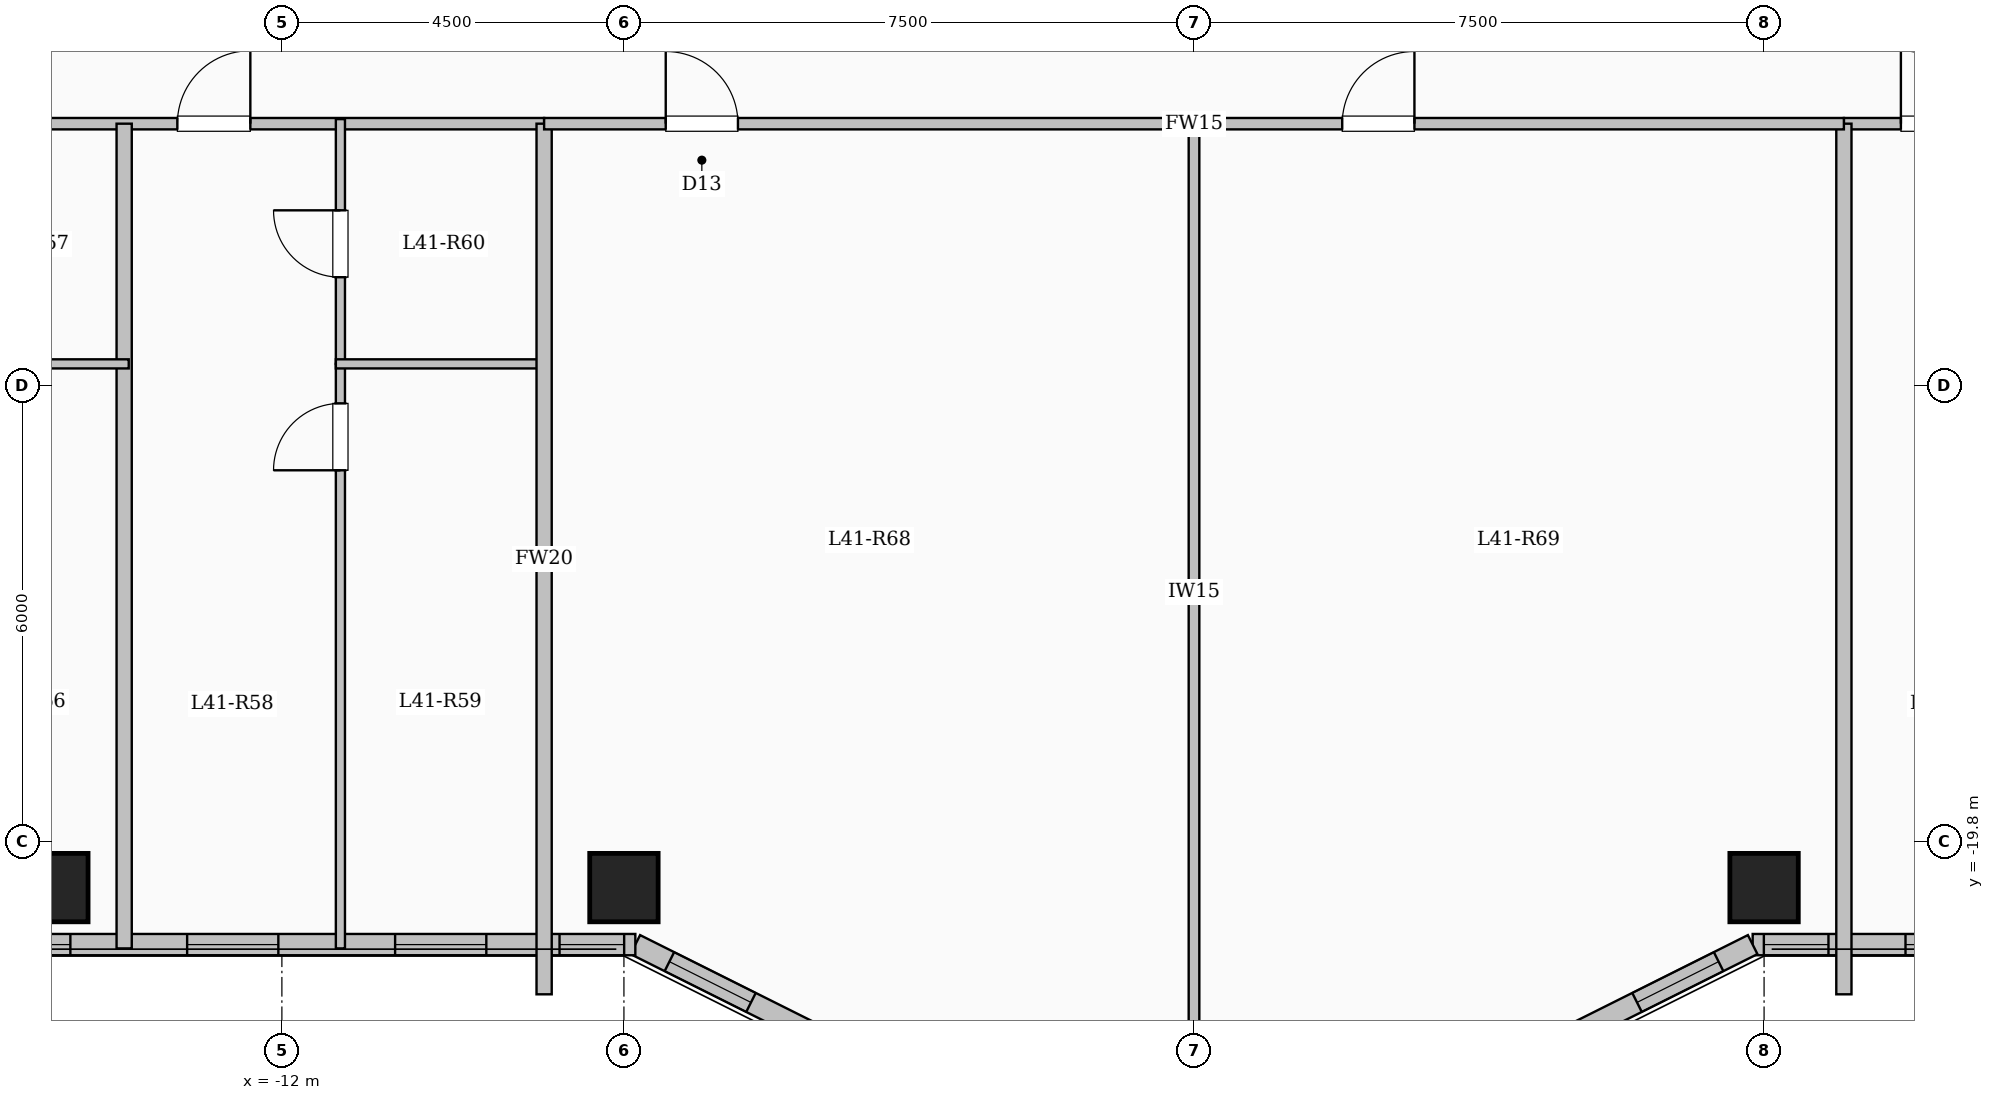
"""IFC4 building model, lengths in metres.
Left out: names, types, materials, properties, quantities, classifications, styles, units other than length and angle.
Written with IfcOpenShell. Run it as: python <this file> out.ifc"""

import sys

from ifc_helpers import new_model, si_unit, direction, frame, frame_2d, origin, origin_2d, place, context, subcontext, project, spatial, rectangle, extrude, element, fill, save


model = new_model("IFC4")
c1 = context("Model", 3, precision=1e-05, world=origin(), true_north=direction((0.0, 1.0)))
c2 = subcontext(c1, "Body", "Model", "MODEL_VIEW")
j1 = project(units=[si_unit("LENGTHUNIT", "METRE"), si_unit("PLANEANGLEUNIT", "RADIAN")], contexts=[c1])
p1 = place(None, origin())
s1 = spatial("IfcSite", under=j1, at=p1, CompositionType="ELEMENT")
p2 = place(p1, origin())
s2 = spatial("IfcBuilding", under=s1, at=p2, CompositionType="ELEMENT")
p3 = place(p2, frame((0.0, 0.0, 152.7)))
s3 = spatial("IfcBuildingStorey", under=s2, at=p3, CompositionType="ELEMENT", Elevation=152.7)
for number, where, z_axis, x_axis in (
    (1, (-15.0, -20.4, 0.0), (0.0, 0.0, 1.0), (1.0, 0.0, 0.0)),
    (2, (-7.5, -20.4, 0.0), (0.0, 0.0, 1.0), (1.0, 0.0, 0.0)),
    (3, (7.5, -20.4, 0.0), (0.0, 0.0, 1.0), (1.0, 0.0, 0.0)),
):
    element("IfcColumn", number, at=place(p3, frame(where, z_axis=z_axis, x_axis=x_axis)), inside=s3, PredefinedType="COLUMN", context=c2, shape_type="SweptSolid", body=[
        extrude(rectangle(XDim=0.9, YDim=0.9, at=origin_2d()), origin(), (0.0, 0.0, 1.0), 3.35),
    ])
p4 = place(p3, frame((19.65, -21.15, 0.0), z_axis=(0.0, 0.0, 1.0), x_axis=(-1.0, 0.0, 0.0)))
e4 = element("IfcWall", 4, at=p4, inside=s3, PredefinedType="SOLIDWALL", context=c2, shape_type="SweptSolid", body=[
    extrude(rectangle(XDim=12.3, YDim=0.28, at=frame_2d((6.15, 0.0))), origin(), (0.0, 0.0, 1.0), 3.1),
])
p5 = place(p4, frame((0.856, 0.0, 0.95)))
e5 = element("IfcOpeningElement", 5, at=p5, cuts=e4, PredefinedType="OPENING", context=c2, shape_type="SweptSolid", body=[
    extrude(rectangle(XDim=1.2, YDim=1.5, at=frame_2d((0.6, 0.75))), frame((0.0, 0.15, 0.0), z_axis=(0.0, -1.0, 0.0), x_axis=(1.0, 0.0, 0.0)), (0.0, 0.0, 1.0), 0.3),
])
p6 = place(p4, frame((3.568, 0.0, 0.9)))
e6 = element("IfcOpeningElement", 6, at=p6, cuts=e4, PredefinedType="OPENING", context=c2, shape_type="SweptSolid", body=[
    extrude(rectangle(XDim=1.5, YDim=1.65, at=frame_2d((0.75, 0.825))), frame((0.0, 0.15, 0.0), z_axis=(0.0, -1.0, 0.0), x_axis=(1.0, 0.0, 0.0)), (0.0, 0.0, 1.0), 0.3),
])
p7 = place(p4, frame((6.454, 0.0, 0.95)))
e7 = element("IfcOpeningElement", 7, at=p7, cuts=e4, PredefinedType="OPENING", context=c2, shape_type="SweptSolid", body=[
    extrude(rectangle(XDim=1.2, YDim=1.5, at=frame_2d((0.6, 0.75))), frame((0.0, 0.15, 0.0), z_axis=(0.0, -1.0, 0.0), x_axis=(1.0, 0.0, 0.0)), (0.0, 0.0, 1.0), 0.3),
])
p8 = place(p4, frame((9.089, 0.0, 0.95)))
e8 = element("IfcOpeningElement", 8, at=p8, cuts=e4, PredefinedType="OPENING", context=c2, shape_type="SweptSolid", body=[
    extrude(rectangle(XDim=1.2, YDim=1.5, at=frame_2d((0.6, 0.75))), frame((0.0, 0.15, 0.0), z_axis=(0.0, -1.0, 0.0), x_axis=(1.0, 0.0, 0.0)), (0.0, 0.0, 1.0), 0.3),
])
p9 = place(p4, frame((11.303, 0.0, 0.95)))
e9 = element("IfcOpeningElement", 9, at=p9, cuts=e4, PredefinedType="OPENING", context=c2, shape_type="SweptSolid", body=[
    extrude(rectangle(XDim=0.85, YDim=1.5, at=frame_2d((0.425, 0.75))), frame((0.0, 0.15, 0.0), z_axis=(0.0, -1.0, 0.0), x_axis=(1.0, 0.0, 0.0)), (0.0, 0.0, 1.0), 0.3),
])
p10 = place(p3, frame((7.35, -21.15, 0.0), z_axis=(0.0, 0.0, 1.0), x_axis=(-0.894427191, -0.4472135955, 0.0)))
e10 = element("IfcWall", 10, at=p10, inside=s3, PredefinedType="SOLIDWALL", context=c2, shape_type="SweptSolid", body=[
    extrude(rectangle(XDim=3.354, YDim=0.28, at=frame_2d((1.677, 0.0))), origin(), (0.0, 0.0, 1.0), 3.1),
])
p11 = place(p10, frame((0.501, 0.0, 0.95)))
e11 = element("IfcOpeningElement", 11, at=p11, cuts=e10, PredefinedType="OPENING", context=c2, shape_type="SweptSolid", body=[
    extrude(rectangle(XDim=1.2, YDim=1.5, at=frame_2d((0.6, 0.75))), frame((0.0, 0.15, 0.0), z_axis=(0.0, -1.0, 0.0), x_axis=(1.0, 0.0, 0.0)), (0.0, 0.0, 1.0), 0.3),
])
p12 = place(p3, frame((-4.35, -22.65, 0.0), z_axis=(0.0, 0.0, 1.0), x_axis=(-0.894427191, 0.4472135955, 0.0)))
e12 = element("IfcWall", 12, at=p12, inside=s3, PredefinedType="SOLIDWALL", context=c2, shape_type="SweptSolid", body=[
    extrude(rectangle(XDim=3.354, YDim=0.28, at=frame_2d((1.677, 0.0))), origin(), (0.0, 0.0, 1.0), 3.1),
])
p13 = place(p12, frame((1.653, 0.0, 0.95)))
e13 = element("IfcOpeningElement", 13, at=p13, cuts=e12, PredefinedType="OPENING", context=c2, shape_type="SweptSolid", body=[
    extrude(rectangle(XDim=1.2, YDim=1.5, at=frame_2d((0.6, 0.75))), frame((0.0, 0.15, 0.0), z_axis=(0.0, -1.0, 0.0), x_axis=(1.0, 0.0, 0.0)), (0.0, 0.0, 1.0), 0.3),
])
p14 = place(p3, frame((-7.35, -21.15, 0.0), z_axis=(0.0, 0.0, 1.0), x_axis=(-1.0, 0.0, 0.0)))
e14 = element("IfcWall", 14, at=p14, inside=s3, PredefinedType="SOLIDWALL", context=c2, shape_type="SweptSolid", body=[
    extrude(rectangle(XDim=12.3, YDim=0.28, at=frame_2d((6.15, 0.0))), origin(), (0.0, 0.0, 1.0), 3.1),
])
p15 = place(p14, frame((0.147, 0.0, 0.95)))
e15 = element("IfcOpeningElement", 15, at=p15, cuts=e14, PredefinedType="OPENING", context=c2, shape_type="SweptSolid", body=[
    extrude(rectangle(XDim=0.85, YDim=1.5, at=frame_2d((0.425, 0.75))), frame((0.0, 0.15, 0.0), z_axis=(0.0, -1.0, 0.0), x_axis=(1.0, 0.0, 0.0)), (0.0, 0.0, 1.0), 0.3),
])
p16 = place(p14, frame((1.96, 0.0, 0.95)))
e16 = element("IfcOpeningElement", 16, at=p16, cuts=e14, PredefinedType="OPENING", context=c2, shape_type="SweptSolid", body=[
    extrude(rectangle(XDim=1.2, YDim=1.5, at=frame_2d((0.6, 0.75))), frame((0.0, 0.15, 0.0), z_axis=(0.0, -1.0, 0.0), x_axis=(1.0, 0.0, 0.0)), (0.0, 0.0, 1.0), 0.3),
])
p17 = place(p14, frame((4.697, 0.0, 0.95)))
e17 = element("IfcOpeningElement", 17, at=p17, cuts=e14, PredefinedType="OPENING", context=c2, shape_type="SweptSolid", body=[
    extrude(rectangle(XDim=1.2, YDim=1.5, at=frame_2d((0.6, 0.75))), frame((0.0, 0.15, 0.0), z_axis=(0.0, -1.0, 0.0), x_axis=(1.0, 0.0, 0.0)), (0.0, 0.0, 1.0), 0.3),
])
p18 = place(p14, frame((7.433, 0.0, 0.95)))
e18 = element("IfcOpeningElement", 18, at=p18, cuts=e14, PredefinedType="OPENING", context=c2, shape_type="SweptSolid", body=[
    extrude(rectangle(XDim=1.2, YDim=1.5, at=frame_2d((0.6, 0.75))), frame((0.0, 0.15, 0.0), z_axis=(0.0, -1.0, 0.0), x_axis=(1.0, 0.0, 0.0)), (0.0, 0.0, 1.0), 0.3),
])
p19 = place(p14, frame((10.194, 0.0, 0.95)))
e19 = element("IfcOpeningElement", 19, at=p19, cuts=e14, PredefinedType="OPENING", context=c2, shape_type="SweptSolid", body=[
    extrude(rectangle(XDim=1.2, YDim=1.5, at=frame_2d((0.6, 0.75))), frame((0.0, 0.15, 0.0), z_axis=(0.0, -1.0, 0.0), x_axis=(1.0, 0.0, 0.0)), (0.0, 0.0, 1.0), 0.3),
])
p20 = place(p3, frame((-19.55, -10.35, 0.0), z_axis=(0.0, 0.0, 1.0), x_axis=(1.0, 0.0, 0.0)))
e20 = element("IfcWall", 20, at=p20, inside=s3, PredefinedType="PARTITIONING", context=c2, shape_type="SweptSolid", body=[
    extrude(rectangle(XDim=11.0, YDim=0.15, at=frame_2d((5.5, 0.0))), origin(), (0.0, 0.0, 1.0), 3.1),
])
p21 = place(p20, frame((0.7, 0.0, 0.0)))
e21 = element("IfcOpeningElement", 21, at=p21, cuts=e20, PredefinedType="OPENING", context=c2, shape_type="SweptSolid", body=[
    extrude(rectangle(XDim=0.96, YDim=2.15, at=frame_2d((0.48, 1.075))), frame((0.0, 0.085, 0.0), z_axis=(0.0, -1.0, 0.0), x_axis=(1.0, 0.0, 0.0)), (0.0, 0.0, 1.0), 0.17),
])
p22 = place(p20, frame((6.175, 0.0, 0.0)))
e22 = element("IfcOpeningElement", 22, at=p22, cuts=e20, PredefinedType="OPENING", context=c2, shape_type="SweptSolid", body=[
    extrude(rectangle(XDim=0.96, YDim=2.15, at=frame_2d((0.48, 1.075))), frame((0.0, 0.085, 0.0), z_axis=(0.0, -1.0, 0.0), x_axis=(1.0, 0.0, 0.0)), (0.0, 0.0, 1.0), 0.17),
])
p23 = place(p3, frame((8.55, -10.35, 0.0), z_axis=(0.0, 0.0, 1.0), x_axis=(1.0, 0.0, 0.0)))
e23 = element("IfcWall", 23, at=p23, inside=s3, PredefinedType="PARTITIONING", context=c2, shape_type="SweptSolid", body=[
    extrude(rectangle(XDim=11.0, YDim=0.15, at=frame_2d((5.5, 0.0))), origin(), (0.0, 0.0, 1.0), 3.1),
])
p24 = place(p23, frame((0.75, 0.0, 0.0)))
e24 = element("IfcOpeningElement", 24, at=p24, cuts=e23, PredefinedType="OPENING", context=c2, shape_type="SweptSolid", body=[
    extrude(rectangle(XDim=0.96, YDim=2.15, at=frame_2d((0.48, 1.075))), frame((0.0, 0.085, 0.0), z_axis=(0.0, -1.0, 0.0), x_axis=(1.0, 0.0, 0.0)), (0.0, 0.0, 1.0), 0.17),
])
p25 = place(p23, frame((6.006, 0.0, 0.0)))
e25 = element("IfcOpeningElement", 25, at=p25, cuts=e23, PredefinedType="OPENING", context=c2, shape_type="SweptSolid", body=[
    extrude(rectangle(XDim=0.96, YDim=2.15, at=frame_2d((0.48, 1.075))), frame((0.0, 0.085, 0.0), z_axis=(0.0, -1.0, 0.0), x_axis=(1.0, 0.0, 0.0)), (0.0, 0.0, 1.0), 0.17),
])
p26 = place(p3, frame((-14.075, -21.2, 0.0), z_axis=(0.0, 0.0, 1.0), x_axis=(0.0, 1.0, 0.0)))
e26 = element("IfcWall", 26, at=p26, inside=s3, PredefinedType="SOLIDWALL", context=c2, shape_type="SweptSolid", body=[
    extrude(rectangle(XDim=10.85, YDim=0.2, at=frame_2d((5.425, 0.0))), origin(), (0.0, 0.0, 1.0), 3.1),
])
p27 = place(p3, frame((-16.765, -13.51, 0.0), z_axis=(0.0, 0.0, 1.0), x_axis=(1.0, 0.0, 0.0)))
e27 = element("IfcWall", 27, at=p27, inside=s3, PredefinedType="PARTITIONING", context=c2, shape_type="SweptSolid", body=[
    extrude(rectangle(XDim=2.75, YDim=0.12, at=frame_2d((1.375, 0.0))), origin(), (0.0, 0.0, 1.0), 3.1),
])
p28 = place(p3, frame((-11.23, -21.2, 0.0), z_axis=(0.0, 0.0, 1.0), x_axis=(0.0, 1.0, 0.0)))
e28 = element("IfcWall", 28, at=p28, inside=s3, PredefinedType="PARTITIONING", context=c2, shape_type="SweptSolid", body=[
    extrude(rectangle(XDim=7.69, YDim=0.12, at=frame_2d((3.845, 0.0))), origin(), (0.0, 0.0, 1.0), 3.1),
])
p29 = place(p28, frame((6.29, 0.0, 0.0)))
e29 = element("IfcOpeningElement", 29, at=p29, cuts=e28, PredefinedType="OPENING", context=c2, shape_type="SweptSolid", body=[
    extrude(rectangle(XDim=0.88, YDim=2.1, at=frame_2d((0.44, 1.05))), frame((0.0, 0.07, 0.0), z_axis=(0.0, -1.0, 0.0), x_axis=(1.0, 0.0, 0.0)), (0.0, 0.0, 1.0), 0.14),
])
p30 = place(p3, frame((-11.23, -13.51, 0.0), z_axis=(0.0, 0.0, 1.0), x_axis=(0.0, 1.0, 0.0)))
e30 = element("IfcWall", 30, at=p30, inside=s3, PredefinedType="PARTITIONING", context=c2, shape_type="SweptSolid", body=[
    extrude(rectangle(XDim=3.22, YDim=0.12, at=frame_2d((1.61, 0.0))), origin(), (0.0, 0.0, 1.0), 3.1),
])
p31 = place(p30, frame((1.14, 0.0, 0.0)))
e31 = element("IfcOpeningElement", 31, at=p31, cuts=e30, PredefinedType="OPENING", context=c2, shape_type="SweptSolid", body=[
    extrude(rectangle(XDim=0.88, YDim=2.1, at=frame_2d((0.44, 1.05))), frame((0.0, 0.07, 0.0), z_axis=(0.0, -1.0, 0.0), x_axis=(1.0, 0.0, 0.0)), (0.0, 0.0, 1.0), 0.14),
])
p32 = place(p3, frame((-11.29, -13.51, 0.0), z_axis=(0.0, 0.0, 1.0), x_axis=(1.0, 0.0, 0.0)))
e32 = element("IfcWall", 32, at=p32, inside=s3, PredefinedType="PARTITIONING", context=c2, shape_type="SweptSolid", body=[
    extrude(rectangle(XDim=2.75, YDim=0.12, at=frame_2d((1.375, 0.0))), origin(), (0.0, 0.0, 1.0), 3.1),
])
for number, where, z_axis, x_axis in (
    (33, (-8.55, -21.804, 0.0), (0.0, 0.0, 1.0), (0.0, 1.0, 0.0)),
    (34, (8.55, -21.804, 0.0), (0.0, 0.0, 1.0), (0.0, 1.0, 0.0)),
):
    element("IfcWall", number, at=place(p3, frame(where, z_axis=z_axis, x_axis=x_axis)), inside=s3, PredefinedType="SOLIDWALL", context=c2, shape_type="SweptSolid", body=[
        extrude(rectangle(XDim=11.454, YDim=0.2, at=frame_2d((5.727, 0.0))), origin(), (0.0, 0.0, 1.0), 3.1),
    ])
p33 = place(p3, frame((-8.55, -10.35, 0.0), z_axis=(0.0, 0.0, 1.0), x_axis=(1.0, 0.0, 0.0)))
e35 = element("IfcWall", 35, at=p33, inside=s3, PredefinedType="PARTITIONING", context=c2, shape_type="SweptSolid", body=[
    extrude(rectangle(XDim=17.1, YDim=0.15, at=frame_2d((8.55, 0.0))), origin(), (0.0, 0.0, 1.0), 3.1),
])
p34 = place(p33, frame((1.6, 0.0, 0.0)))
e36 = element("IfcOpeningElement", 36, at=p34, cuts=e35, PredefinedType="OPENING", context=c2, shape_type="SweptSolid", body=[
    extrude(rectangle(XDim=0.95, YDim=2.15, at=frame_2d((0.475, 1.075))), frame((0.0, 0.085, 0.0), z_axis=(0.0, -1.0, 0.0), x_axis=(1.0, 0.0, 0.0)), (0.0, 0.0, 1.0), 0.17),
])
p35 = place(p33, frame((10.5, 0.0, 0.0)))
e37 = element("IfcOpeningElement", 37, at=p35, cuts=e35, PredefinedType="OPENING", context=c2, shape_type="SweptSolid", body=[
    extrude(rectangle(XDim=0.95, YDim=2.15, at=frame_2d((0.475, 1.075))), frame((0.0, 0.085, 0.0), z_axis=(0.0, -1.0, 0.0), x_axis=(1.0, 0.0, 0.0)), (0.0, 0.0, 1.0), 0.17),
])
p36 = place(p3, frame((0.0, -22.68, 0.0), z_axis=(0.0, 0.0, 1.0), x_axis=(0.0, 1.0, 0.0)))
e38 = element("IfcWall", 38, at=p36, inside=s3, PredefinedType="PARTITIONING", context=c2, shape_type="SweptSolid", body=[
    extrude(rectangle(XDim=12.33, YDim=0.14, at=frame_2d((6.165, 0.0))), origin(), (0.0, 0.0, 1.0), 3.1),
])
p37 = place(p8, origin())
e39 = element("IfcWindow", 39, at=p37, inside=s3, PartitioningType="SINGLE_PANEL", PredefinedType="WINDOW", context=c2, shape_type="SweptSolid", body=[
    extrude(rectangle(XDim=1.2, YDim=1.5, at=frame_2d((0.6, 0.75))), frame((0.0, 0.03, 0.0), z_axis=(0.0, -1.0, 0.0), x_axis=(1.0, 0.0, 0.0)), (0.0, 0.0, 1.0), 0.06),
])
fill(e8, e39)
p38 = place(p9, origin())
e40 = element("IfcWindow", 40, at=p38, inside=s3, PartitioningType="SINGLE_PANEL", PredefinedType="WINDOW", context=c2, shape_type="SweptSolid", body=[
    extrude(rectangle(XDim=0.85, YDim=1.5, at=frame_2d((0.425, 0.75))), frame((0.0, 0.03, 0.0), z_axis=(0.0, -1.0, 0.0), x_axis=(1.0, 0.0, 0.0)), (0.0, 0.0, 1.0), 0.06),
])
fill(e9, e40)
p39 = place(p11, origin())
e41 = element("IfcWindow", 41, at=p39, inside=s3, PartitioningType="SINGLE_PANEL", PredefinedType="WINDOW", context=c2, shape_type="SweptSolid", body=[
    extrude(rectangle(XDim=1.2, YDim=1.5, at=frame_2d((0.6, 0.75))), frame((0.0, 0.03, 0.0), z_axis=(0.0, -1.0, 0.0), x_axis=(1.0, 0.0, 0.0)), (0.0, 0.0, 1.0), 0.06),
])
fill(e11, e41)
p40 = place(p13, origin())
e42 = element("IfcWindow", 42, at=p40, inside=s3, PartitioningType="SINGLE_PANEL", PredefinedType="WINDOW", context=c2, shape_type="SweptSolid", body=[
    extrude(rectangle(XDim=1.2, YDim=1.5, at=frame_2d((0.6, 0.75))), frame((0.0, 0.03, 0.0), z_axis=(0.0, -1.0, 0.0), x_axis=(1.0, 0.0, 0.0)), (0.0, 0.0, 1.0), 0.06),
])
fill(e13, e42)
p41 = place(p15, origin())
e43 = element("IfcWindow", 43, at=p41, inside=s3, PartitioningType="SINGLE_PANEL", PredefinedType="WINDOW", context=c2, shape_type="SweptSolid", body=[
    extrude(rectangle(XDim=0.85, YDim=1.5, at=frame_2d((0.425, 0.75))), frame((0.0, 0.03, 0.0), z_axis=(0.0, -1.0, 0.0), x_axis=(1.0, 0.0, 0.0)), (0.0, 0.0, 1.0), 0.06),
])
fill(e15, e43)
p42 = place(p16, origin())
e44 = element("IfcWindow", 44, at=p42, inside=s3, PartitioningType="SINGLE_PANEL", PredefinedType="WINDOW", context=c2, shape_type="SweptSolid", body=[
    extrude(rectangle(XDim=1.2, YDim=1.5, at=frame_2d((0.6, 0.75))), frame((0.0, 0.03, 0.0), z_axis=(0.0, -1.0, 0.0), x_axis=(1.0, 0.0, 0.0)), (0.0, 0.0, 1.0), 0.06),
])
fill(e16, e44)
p43 = place(p17, origin())
e45 = element("IfcWindow", 45, at=p43, inside=s3, PartitioningType="SINGLE_PANEL", PredefinedType="WINDOW", context=c2, shape_type="SweptSolid", body=[
    extrude(rectangle(XDim=1.2, YDim=1.5, at=frame_2d((0.6, 0.75))), frame((0.0, 0.03, 0.0), z_axis=(0.0, -1.0, 0.0), x_axis=(1.0, 0.0, 0.0)), (0.0, 0.0, 1.0), 0.06),
])
fill(e17, e45)
p44 = place(p18, origin())
e46 = element("IfcWindow", 46, at=p44, inside=s3, PartitioningType="SINGLE_PANEL", PredefinedType="WINDOW", context=c2, shape_type="SweptSolid", body=[
    extrude(rectangle(XDim=1.2, YDim=1.5, at=frame_2d((0.6, 0.75))), frame((0.0, 0.03, 0.0), z_axis=(0.0, -1.0, 0.0), x_axis=(1.0, 0.0, 0.0)), (0.0, 0.0, 1.0), 0.06),
])
fill(e18, e46)
p45 = place(p22, origin())
e47 = element("IfcDoor", 47, at=p45, inside=s3, OperationType="SINGLE_SWING_RIGHT", PredefinedType="DOOR", context=c2, shape_type="SweptSolid", body=[
    extrude(rectangle(XDim=0.96, YDim=2.15, at=frame_2d((0.48, 1.075))), frame((0.0, 0.025, 0.0), z_axis=(0.0, -1.0, 0.0), x_axis=(1.0, 0.0, 0.0)), (0.0, 0.0, 1.0), 0.05),
])
fill(e22, e47)
p46 = place(p29, origin())
e48 = element("IfcDoor", 48, at=p46, inside=s3, OperationType="SINGLE_SWING_LEFT", PredefinedType="DOOR", context=c2, shape_type="SweptSolid", body=[
    extrude(rectangle(XDim=0.88, YDim=2.1, at=frame_2d((0.44, 1.05))), frame((0.0, 0.025, 0.0), z_axis=(0.0, -1.0, 0.0), x_axis=(1.0, 0.0, 0.0)), (0.0, 0.0, 1.0), 0.05),
])
fill(e29, e48)
p47 = place(p31, origin())
e49 = element("IfcDoor", 49, at=p47, inside=s3, OperationType="SINGLE_SWING_RIGHT", PredefinedType="DOOR", context=c2, shape_type="SweptSolid", body=[
    extrude(rectangle(XDim=0.88, YDim=2.1, at=frame_2d((0.44, 1.05))), frame((0.0, 0.025, 0.0), z_axis=(0.0, -1.0, 0.0), x_axis=(1.0, 0.0, 0.0)), (0.0, 0.0, 1.0), 0.05),
])
fill(e31, e49)
p48 = place(p24, origin())
e50 = element("IfcDoor", 50, at=p48, inside=s3, OperationType="SINGLE_SWING_LEFT", PredefinedType="DOOR", context=c2, shape_type="SweptSolid", body=[
    extrude(rectangle(XDim=0.96, YDim=2.15, at=frame_2d((0.48, 1.075))), frame((0.0, 0.025, 0.0), z_axis=(0.0, -1.0, 0.0), x_axis=(1.0, 0.0, 0.0)), (0.0, 0.0, 1.0), 0.05),
])
fill(e24, e50)
p49 = place(p34, origin())
e51 = element("IfcDoor", 51, at=p49, inside=s3, OperationType="SINGLE_SWING_LEFT", PredefinedType="DOOR", context=c2, shape_type="SweptSolid", body=[
    extrude(rectangle(XDim=0.95, YDim=2.15, at=frame_2d((0.475, 1.075))), frame((0.0, 0.025, 0.0), z_axis=(0.0, -1.0, 0.0), x_axis=(1.0, 0.0, 0.0)), (0.0, 0.0, 1.0), 0.05),
])
fill(e36, e51)
p50 = place(p35, origin())
e52 = element("IfcDoor", 52, at=p50, inside=s3, OperationType="SINGLE_SWING_RIGHT", PredefinedType="DOOR", context=c2, shape_type="SweptSolid", body=[
    extrude(rectangle(XDim=0.95, YDim=2.15, at=frame_2d((0.475, 1.075))), frame((0.0, 0.025, 0.0), z_axis=(0.0, -1.0, 0.0), x_axis=(1.0, 0.0, 0.0)), (0.0, 0.0, 1.0), 0.05),
])
fill(e37, e52)
save(model, sys.argv[1])
